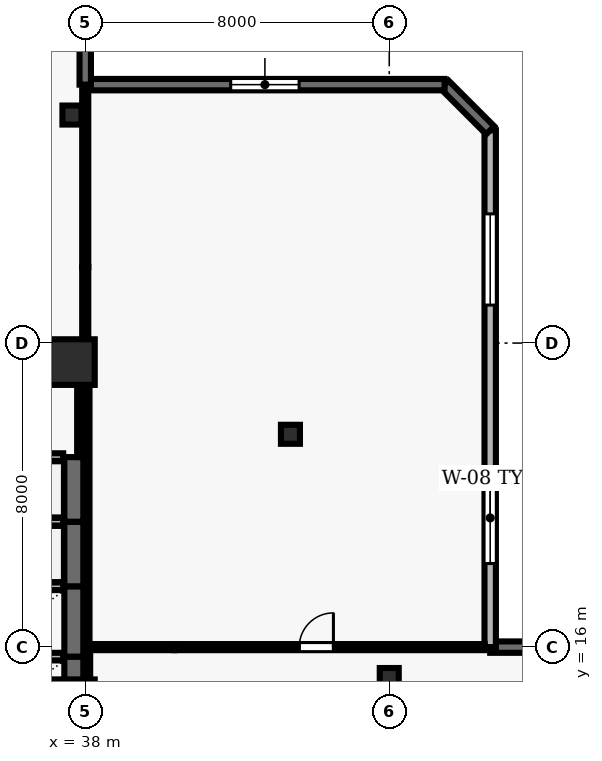
"""IFC4 building model, lengths in metres.
Left out: names, types, materials, properties, quantities, classifications, styles, units other than length and angle.
Written with IfcOpenShell. Run it as: python <this file> out.ifc"""

import sys

from ifc_helpers import new_model, si_unit, direction, frame, frame_2d, origin, origin_2d, place, context, subcontext, project, spatial, rectangle, hollow_rectangle, extrude, element, fill, save


model = new_model("IFC4")
c1 = context("Model", 3, precision=1e-05, world=origin(), true_north=direction((0.0, 1.0)))
c2 = subcontext(c1, "Body", "Model", "MODEL_VIEW")
j1 = project(units=[si_unit("LENGTHUNIT", "METRE"), si_unit("PLANEANGLEUNIT", "RADIAN")], contexts=[c1])
p1 = place(None, origin())
s1 = spatial("IfcSite", under=j1, at=p1, CompositionType="ELEMENT")
p2 = place(p1, origin())
s2 = spatial("IfcBuilding", under=s1, at=p2, CompositionType="ELEMENT")
p3 = place(p2, frame((0.0, 0.0, 111.2)))
s3 = spatial("IfcBuildingStorey", under=s2, at=p3, CompositionType="ELEMENT", Elevation=111.2)
for number, where, z_axis, x_axis in (
    (1, (37.65, 14.55, 0.0), (0.0, 0.0, 1.0), (1.0, 0.0, 0.0)),
    (2, (37.65, 23.5, 0.0), (0.0, 0.0, 1.0), (1.0, 0.0, 0.0)),
):
    element("IfcColumn", number, at=place(p3, frame(where, z_axis=z_axis, x_axis=x_axis)), inside=s3, PredefinedType="COLUMN", context=c2, shape_type="SweptSolid", body=[
        extrude(rectangle(XDim=1.2, YDim=1.2, at=origin_2d()), origin(), (0.0, 0.0, 1.0), 3.9),
    ])
for number, where, z_axis, x_axis in (
    (3, (46.0, 15.2, 0.0), (0.0, 0.0, 1.0), (1.0, 0.0, 0.0)),
    (4, (37.65, 30.0, 0.0), (0.0, 0.0, 1.0), (1.0, 0.0, 0.0)),
    (5, (43.4, 21.6, 0.0), (0.0, 0.0, 1.0), (1.0, 0.0, 0.0)),
):
    element("IfcColumn", number, at=place(p3, frame(where, z_axis=z_axis, x_axis=x_axis)), inside=s3, PredefinedType="COLUMN", context=c2, shape_type="SweptSolid", body=[
        extrude(hollow_rectangle(XDim=0.5, YDim=0.5, WallThickness=0.025, at=origin_2d()), origin(), (0.0, 0.0, 1.0), 3.9),
    ])
p4 = place(p3, frame((68.1, 16.0, 0.0), z_axis=(0.0, 0.0, 1.0), x_axis=(-1.0, 0.0, 0.0)))
e6 = element("IfcWall", 6, at=p4, inside=s3, PredefinedType="SOLIDWALL", context=c2, shape_type="SweptSolid", body=[
    extrude(rectangle(XDim=19.444, YDim=0.3, at=frame_2d((9.722, 0.0))), origin(), (0.0, 0.0, 1.0), 3.69),
])
p5 = place(p4, frame((6.922, 0.0, 0.0)))
e7 = element("IfcOpeningElement", 7, at=p5, cuts=e6, PredefinedType="OPENING", context=c2, shape_type="SweptSolid", body=[
    extrude(rectangle(XDim=1.0, YDim=2.2, at=frame_2d((0.5, 1.1))), frame((0.0, 0.16, 0.0), z_axis=(0.0, -1.0, 0.0), x_axis=(1.0, 0.0, 0.0)), (0.0, 0.0, 1.0), 0.32),
])
p6 = place(p4, frame((2.341, 0.0, 0.9)))
e8 = element("IfcOpeningElement", 8, at=p6, cuts=e6, PredefinedType="OPENING", context=c2, shape_type="SweptSolid", body=[
    extrude(rectangle(XDim=1.8, YDim=1.8, at=frame_2d((0.9, 0.9))), frame((0.0, 0.16, 0.0), z_axis=(0.0, -1.0, 0.0), x_axis=(1.0, 0.0, 0.0)), (0.0, 0.0, 1.0), 0.32),
])
p7 = place(p4, frame((8.822, 0.0, 0.9)))
e9 = element("IfcOpeningElement", 9, at=p7, cuts=e6, PredefinedType="OPENING", context=c2, shape_type="SweptSolid", body=[
    extrude(rectangle(XDim=1.8, YDim=1.8, at=frame_2d((0.9, 0.9))), frame((0.0, 0.16, 0.0), z_axis=(0.0, -1.0, 0.0), x_axis=(1.0, 0.0, 0.0)), (0.0, 0.0, 1.0), 0.32),
])
p8 = place(p4, frame((15.303, 0.0, 0.9)))
e10 = element("IfcOpeningElement", 10, at=p8, cuts=e6, PredefinedType="OPENING", context=c2, shape_type="SweptSolid", body=[
    extrude(rectangle(XDim=1.8, YDim=1.8, at=frame_2d((0.9, 0.9))), frame((0.0, 0.16, 0.0), z_axis=(0.0, -1.0, 0.0), x_axis=(1.0, 0.0, 0.0)), (0.0, 0.0, 1.0), 0.32),
])
p9 = place(p3, frame((48.656, 16.0, 0.0), z_axis=(0.0, 0.0, 1.0), x_axis=(0.0, 1.0, 0.0)))
e11 = element("IfcWall", 11, at=p9, inside=s3, PredefinedType="SOLIDWALL", context=c2, shape_type="SweptSolid", body=[
    extrude(rectangle(XDim=13.6, YDim=0.3, at=frame_2d((6.8, 0.0))), origin(), (0.0, 0.0, 1.0), 3.69),
])
p10 = place(p9, frame((2.2, 0.0, 0.9)))
e12 = element("IfcOpeningElement", 12, at=p10, cuts=e11, PredefinedType="OPENING", context=c2, shape_type="SweptSolid", body=[
    extrude(rectangle(XDim=2.4, YDim=1.8, at=frame_2d((1.2, 0.9))), frame((0.0, 0.16, 0.0), z_axis=(0.0, -1.0, 0.0), x_axis=(1.0, 0.0, 0.0)), (0.0, 0.0, 1.0), 0.32),
])
p11 = place(p9, frame((9.0, 0.0, 0.9)))
e13 = element("IfcOpeningElement", 13, at=p11, cuts=e11, PredefinedType="OPENING", context=c2, shape_type="SweptSolid", body=[
    extrude(rectangle(XDim=2.4, YDim=1.8, at=frame_2d((1.2, 0.9))), frame((0.0, 0.16, 0.0), z_axis=(0.0, -1.0, 0.0), x_axis=(1.0, 0.0, 0.0)), (0.0, 0.0, 1.0), 0.32),
])
p12 = place(p3, frame((48.656, 29.6, 0.0), z_axis=(0.0, 0.0, 1.0), x_axis=(-0.707106781187, 0.707106781187, 0.0)))
e14 = element("IfcWall", 14, at=p12, inside=s3, PredefinedType="SOLIDWALL", context=c2, shape_type="SweptSolid", body=[
    extrude(rectangle(XDim=1.697, YDim=0.3, at=frame_2d((0.849, 0.0))), origin(), (0.0, 0.0, 1.0), 3.69),
])
p13 = place(p3, frame((47.456, 30.8, 0.0), z_axis=(0.0, 0.0, 1.0), x_axis=(-1.0, 0.0, 0.0)))
e15 = element("IfcWall", 15, at=p13, inside=s3, PredefinedType="SOLIDWALL", context=c2, shape_type="SweptSolid", body=[
    extrude(rectangle(XDim=9.456, YDim=0.3, at=frame_2d((4.728, 0.0))), origin(), (0.0, 0.0, 1.0), 3.69),
])
p14 = place(p13, frame((3.828, 0.0, 0.9)))
e16 = element("IfcOpeningElement", 16, at=p14, cuts=e15, PredefinedType="OPENING", context=c2, shape_type="SweptSolid", body=[
    extrude(rectangle(XDim=1.8, YDim=2.2, at=frame_2d((0.9, 1.1))), frame((0.0, 0.16, 0.0), z_axis=(0.0, -1.0, 0.0), x_axis=(1.0, 0.0, 0.0)), (0.0, 0.0, 1.0), 0.32),
])
p15 = place(p3, frame((38.0, 30.8, 0.0), z_axis=(0.0, 0.0, 1.0), x_axis=(0.0, 1.0, 0.0)))
e17 = element("IfcWall", 17, at=p15, inside=s3, PredefinedType="SOLIDWALL", context=c2, shape_type="SweptSolid", body=[
    extrude(rectangle(XDim=15.3, YDim=0.3, at=frame_2d((7.65, 0.0))), origin(), (0.0, 0.0, 1.0), 3.69),
])
p16 = place(p15, frame((7.25, 0.0, 0.0)))
e18 = element("IfcOpeningElement", 18, at=p16, cuts=e17, PredefinedType="OPENING", context=c2, shape_type="SweptSolid", body=[
    extrude(rectangle(XDim=1.0, YDim=2.2, at=frame_2d((0.5, 1.1))), frame((0.0, 0.16, 0.0), z_axis=(0.0, -1.0, 0.0), x_axis=(1.0, 0.0, 0.0)), (0.0, 0.0, 1.0), 0.32),
])
p17 = place(p15, frame((1.725, 0.0, 0.9)))
e19 = element("IfcOpeningElement", 19, at=p17, cuts=e17, PredefinedType="OPENING", context=c2, shape_type="SweptSolid", body=[
    extrude(rectangle(XDim=2.4, YDim=2.2, at=frame_2d((1.2, 1.1))), frame((0.0, 0.16, 0.0), z_axis=(0.0, -1.0, 0.0), x_axis=(1.0, 0.0, 0.0)), (0.0, 0.0, 1.0), 0.32),
])
p18 = place(p15, frame((11.175, 0.0, 0.9)))
e20 = element("IfcOpeningElement", 20, at=p18, cuts=e17, PredefinedType="OPENING", context=c2, shape_type="SweptSolid", body=[
    extrude(rectangle(XDim=2.4, YDim=2.2, at=frame_2d((1.2, 1.1))), frame((0.0, 0.16, 0.0), z_axis=(0.0, -1.0, 0.0), x_axis=(1.0, 0.0, 0.0)), (0.0, 0.0, 1.0), 0.32),
])
p19 = place(p3, frame((37.7, 13.9, 0.0), z_axis=(0.0, 0.0, 1.0), x_axis=(0.0, 1.0, 0.0)))
e21 = element("IfcWall", 21, at=p19, inside=s3, PredefinedType="SHEAR", context=c2, shape_type="SweptSolid", body=[
    extrude(rectangle(XDim=1.85, YDim=0.5, at=frame_2d((0.925, 0.0))), origin(), (0.0, 0.0, 1.0), 3.69),
])
p20 = place(p3, frame((37.42, 15.75, 0.0), z_axis=(0.0, 0.0, 1.0), x_axis=(-1.0, 0.0, 0.0)))
e22 = element("IfcWall", 22, at=p20, inside=s3, PredefinedType="SOLIDWALL", context=c2, shape_type="SweptSolid", body=[
    extrude(rectangle(XDim=2.14, YDim=0.2, at=frame_2d((1.07, 0.0))), origin(), (0.0, 0.0, 1.0), 3.69),
])
p21 = place(p3, frame((37.7, 15.75, 0.0), z_axis=(0.0, 0.0, 1.0), x_axis=(0.0, 1.0, 0.0)))
e23 = element("IfcWall", 23, at=p21, inside=s3, PredefinedType="SHEAR", context=c2, shape_type="SweptSolid", body=[
    extrude(rectangle(XDim=1.85, YDim=0.5, at=frame_2d((0.925, 0.0))), origin(), (0.0, 0.0, 1.0), 3.69),
])
p22 = place(p3, frame((37.42, 17.6, 0.0), z_axis=(0.0, 0.0, 1.0), x_axis=(-1.0, 0.0, 0.0)))
e24 = element("IfcWall", 24, at=p22, inside=s3, PredefinedType="SOLIDWALL", context=c2, shape_type="SweptSolid", body=[
    extrude(rectangle(XDim=2.14, YDim=0.2, at=frame_2d((1.07, 0.0))), origin(), (0.0, 0.0, 1.0), 3.69),
])
p23 = place(p3, frame((37.7, 17.6, 0.0), z_axis=(0.0, 0.0, 1.0), x_axis=(0.0, 1.0, 0.0)))
e25 = element("IfcWall", 25, at=p23, inside=s3, PredefinedType="SHEAR", context=c2, shape_type="SweptSolid", body=[
    extrude(rectangle(XDim=1.7, YDim=0.5, at=frame_2d((0.85, 0.0))), origin(), (0.0, 0.0, 1.0), 3.69),
])
p24 = place(p3, frame((37.42, 19.3, 0.0), z_axis=(0.0, 0.0, 1.0), x_axis=(-1.0, 0.0, 0.0)))
e26 = element("IfcWall", 26, at=p24, inside=s3, PredefinedType="SOLIDWALL", context=c2, shape_type="SweptSolid", body=[
    extrude(rectangle(XDim=2.14, YDim=0.2, at=frame_2d((1.07, 0.0))), origin(), (0.0, 0.0, 1.0), 3.69),
])
p25 = place(p3, frame((37.7, 19.3, 0.0), z_axis=(0.0, 0.0, 1.0), x_axis=(0.0, 1.0, 0.0)))
e27 = element("IfcWall", 27, at=p25, inside=s3, PredefinedType="SHEAR", context=c2, shape_type="SweptSolid", body=[
    extrude(rectangle(XDim=1.7, YDim=0.5, at=frame_2d((0.85, 0.0))), origin(), (0.0, 0.0, 1.0), 3.69),
])
p26 = place(p3, frame((37.42, 21.0, 0.0), z_axis=(0.0, 0.0, 1.0), x_axis=(-1.0, 0.0, 0.0)))
e28 = element("IfcWall", 28, at=p26, inside=s3, PredefinedType="SOLIDWALL", context=c2, shape_type="SweptSolid", body=[
    extrude(rectangle(XDim=2.14, YDim=0.2, at=frame_2d((1.07, 0.0))), origin(), (0.0, 0.0, 1.0), 3.69),
])
p27 = place(p3, frame((37.85, 23.85, 0.0), z_axis=(0.0, 0.0, 1.0), x_axis=(-1.0, 0.0, 0.0)))
e29 = element("IfcWall", 29, at=p27, inside=s3, PredefinedType="PARTITIONING", context=c2, shape_type="SweptSolid", body=[
    extrude(rectangle(XDim=2.0, YDim=0.16, at=frame_2d((1.0, 0.0))), origin(), (0.0, 0.0, 1.0), 3.074),
])
p28 = place(p3, frame((40.35, 16.0, 0.0), z_axis=(0.0, 0.0, 1.0), x_axis=(-1.0, 0.0, 0.0)))
e30 = element("IfcWall", 30, at=p28, inside=s3, PredefinedType="PARTITIONING", context=c2, shape_type="SweptSolid", body=[
    extrude(rectangle(XDim=2.3, YDim=0.16, at=frame_2d((1.15, 0.0))), origin(), (0.0, 0.0, 1.0), 3.69),
])
p29 = place(p3, frame((40.35, 16.0, 0.0), z_axis=(0.0, 0.0, 1.0), x_axis=(1.0, 0.0, 0.0)))
e31 = element("IfcWall", 31, at=p29, inside=s3, PredefinedType="PARTITIONING", context=c2, shape_type="SweptSolid", body=[
    extrude(rectangle(XDim=8.161, YDim=0.16, at=frame_2d((4.081, 0.0))), origin(), (0.0, 0.0, 1.0), 3.69),
])
p30 = place(p29, frame((3.281, 0.0, 0.0)))
e32 = element("IfcOpeningElement", 32, at=p30, cuts=e31, PredefinedType="OPENING", context=c2, shape_type="SweptSolid", body=[
    extrude(rectangle(XDim=0.9, YDim=2.1, at=frame_2d((0.45, 1.05))), frame((0.0, 0.09, 0.0), z_axis=(0.0, -1.0, 0.0), x_axis=(1.0, 0.0, 0.0)), (0.0, 0.0, 1.0), 0.18),
])
p31 = place(p3, frame((37.85, 21.0, 0.0), z_axis=(0.0, 0.0, 1.0), x_axis=(0.0, 1.0, 0.0)))
e33 = element("IfcWall", 33, at=p31, inside=s3, PredefinedType="PARTITIONING", context=c2, shape_type="SweptSolid", body=[
    extrude(rectangle(XDim=2.775, YDim=0.125, at=frame_2d((1.387, 0.0))), origin(), (0.0, 0.0, 1.0), 3.074),
])
p32 = place(p3, frame((38.0, 23.85, 0.0), z_axis=(0.0, 0.0, 1.0), x_axis=(0.0, 1.0, 0.0)))
e34 = element("IfcWall", 34, at=p32, inside=s3, PredefinedType="PARTITIONING", context=c2, shape_type="SweptSolid", body=[
    extrude(rectangle(XDim=2.15, YDim=0.16, at=frame_2d((1.075, 0.0))), origin(), (0.0, 0.0, 1.0), 3.074),
])
p33 = place(p3, frame((38.0, 26.0, 0.0), z_axis=(0.0, 0.0, 1.0), x_axis=(0.0, 1.0, 0.0)))
e35 = element("IfcWall", 35, at=p33, inside=s3, PredefinedType="PARTITIONING", context=c2, shape_type="SweptSolid", body=[
    extrude(rectangle(XDim=4.655, YDim=0.16, at=frame_2d((2.328, 0.0))), origin(), (0.0, 0.0, 1.0), 3.074),
])
p34 = place(p3, frame((38.05, 15.925, 0.0), z_axis=(0.0, 0.0, 1.0), x_axis=(0.0, -1.0, 0.0)))
e36 = element("IfcWall", 36, at=p34, inside=s3, PredefinedType="PARTITIONING", context=c2, shape_type="SweptSolid", body=[
    extrude(rectangle(XDim=6.375, YDim=0.16, at=frame_2d((3.188, 0.0))), origin(), (0.0, 0.0, 1.0), 3.074),
])
p35 = place(p3, frame((38.05, 23.85, 0.0), z_axis=(0.0, 0.0, 1.0), x_axis=(0.0, -1.0, 0.0)))
e37 = element("IfcWall", 37, at=p35, inside=s3, PredefinedType="PARTITIONING", context=c2, shape_type="SweptSolid", body=[
    extrude(rectangle(XDim=7.775, YDim=0.125, at=frame_2d((3.888, 0.0))), origin(), (0.0, 0.0, 1.0), 3.074),
])
p36 = place(p10, origin())
e38 = element("IfcWindow", 38, at=p36, inside=s3, PartitioningType="SINGLE_PANEL", PredefinedType="WINDOW", context=c2, shape_type="SweptSolid", body=[
    extrude(rectangle(XDim=2.4, YDim=1.8, at=frame_2d((1.2, 0.9))), frame((0.0, 0.03, 0.0), z_axis=(0.0, -1.0, 0.0), x_axis=(1.0, 0.0, 0.0)), (0.0, 0.0, 1.0), 0.06),
])
fill(e12, e38)
p37 = place(p11, origin())
e39 = element("IfcWindow", 39, at=p37, inside=s3, PartitioningType="SINGLE_PANEL", PredefinedType="WINDOW", context=c2, shape_type="SweptSolid", body=[
    extrude(rectangle(XDim=2.4, YDim=1.8, at=frame_2d((1.2, 0.9))), frame((0.0, 0.03, 0.0), z_axis=(0.0, -1.0, 0.0), x_axis=(1.0, 0.0, 0.0)), (0.0, 0.0, 1.0), 0.06),
])
fill(e13, e39)
p38 = place(p14, origin())
e40 = element("IfcWindow", 40, at=p38, inside=s3, PartitioningType="SINGLE_PANEL", PredefinedType="WINDOW", context=c2, shape_type="SweptSolid", body=[
    extrude(rectangle(XDim=1.8, YDim=2.2, at=frame_2d((0.9, 1.1))), frame((0.0, 0.03, 0.0), z_axis=(0.0, -1.0, 0.0), x_axis=(1.0, 0.0, 0.0)), (0.0, 0.0, 1.0), 0.06),
])
fill(e16, e40)
p39 = place(p30, origin())
e41 = element("IfcDoor", 41, at=p39, inside=s3, OperationType="SINGLE_SWING_RIGHT", PredefinedType="DOOR", context=c2, shape_type="SweptSolid", body=[
    extrude(rectangle(XDim=0.9, YDim=2.1, at=frame_2d((0.45, 1.05))), frame((0.0, 0.025, 0.0), z_axis=(0.0, -1.0, 0.0), x_axis=(1.0, 0.0, 0.0)), (0.0, 0.0, 1.0), 0.05),
])
fill(e32, e41)
save(model, sys.argv[1])
